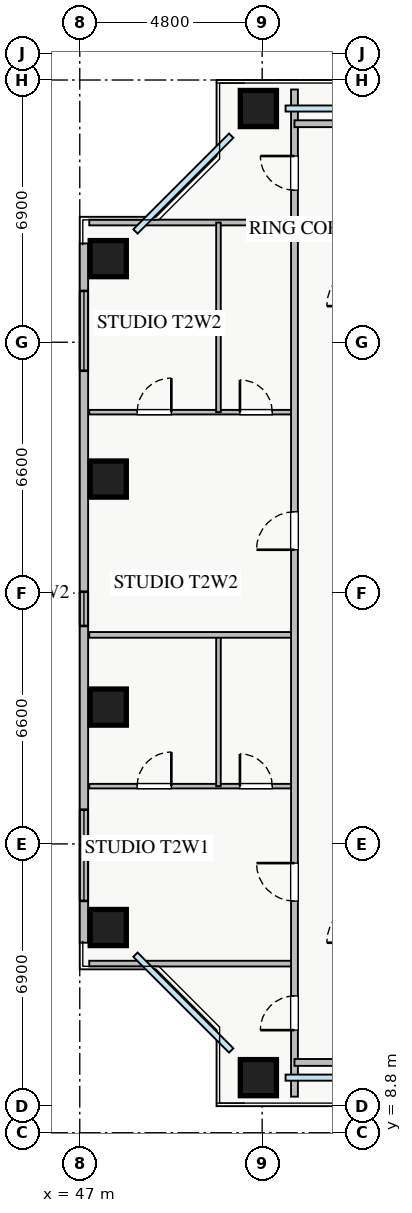
"""IFC4 building model, lengths in metres.
Left out: names, types, materials, properties, quantities, classifications, styles, units other than length and angle.
Written with IfcOpenShell. Run it as: python <this file> out.ifc"""

import sys

from ifc_helpers import new_model, si_unit, direction, frame, frame_2d, origin, origin_2d, place, context, subcontext, project, spatial, rectangle, extrude, source, transform, mapped, element, fill, save


model = new_model("IFC4")
c1 = context("Model", 3, precision=1e-05, world=origin(), true_north=direction((0.0, 1.0)))
c2 = subcontext(c1, "Body", "Model", "MODEL_VIEW")
j1 = project(units=[si_unit("LENGTHUNIT", "METRE"), si_unit("PLANEANGLEUNIT", "RADIAN")], contexts=[c1])
p1 = place(None, origin())
s1 = spatial("IfcSite", under=j1, at=p1, CompositionType="ELEMENT")
p2 = place(p1, origin())
s2 = spatial("IfcBuilding", under=s1, at=p2, CompositionType="ELEMENT")
p3 = place(p2, frame((0.0, 0.0, 29.5)))
s3 = spatial("IfcBuildingStorey", under=s2, at=p3, CompositionType="ELEMENT", Elevation=29.5)
m1 = source(origin(), c2, "Body", "SweptSolid", [
    extrude(rectangle(XDim=0.95, YDim=0.95, at=origin_2d()), origin(), (0.0, 0.0, 1.0), 3.25),
])
for number, where, z_axis, x_axis in (
    (1, (51.7, 10.25, 0.0), (0.0, 0.0, 1.0), (1.0, 0.0, 0.0)),
    (2, (51.7, 35.75, 0.0), (0.0, 0.0, 1.0), (1.0, 0.0, 0.0)),
    (3, (47.75, 14.2, 0.0), (0.0, 0.0, 1.0), (1.0, 0.0, 0.0)),
    (4, (47.75, 20.0, 0.0), (0.0, 0.0, 1.0), (1.0, 0.0, 0.0)),
    (5, (47.75, 26.0, 0.0), (0.0, 0.0, 1.0), (1.0, 0.0, 0.0)),
    (6, (47.75, 31.8, 0.0), (0.0, 0.0, 1.0), (1.0, 0.0, 0.0)),
):
    element("IfcColumn", number, at=place(p3, frame(where, z_axis=z_axis, x_axis=x_axis)), inside=s3, PredefinedType="COLUMN", context=c2, shape_type="MappedRepresentation", body=[
        mapped(m1, transform((0.0, 0.0, 0.0), x_axis=(1.0, 0.0, 0.0), y_axis=(0.0, 1.0, 0.0), z_axis=(0.0, 0.0, 1.0), scale=1.0)),
    ])
p4 = place(p3, frame((47.11, 13.8, 0.0), z_axis=(0.0, 0.0, 1.0), x_axis=(0.0, 1.0, 0.0)))
e7 = element("IfcWall", 7, at=p4, inside=s3, PredefinedType="STANDARD", context=c2, shape_type="SweptSolid", body=[
    extrude(rectangle(XDim=18.4, YDim=0.22, at=frame_2d((9.2, 0.0))), origin(), (0.0, 0.0, 1.0), 2.61),
])
p5 = place(p4, frame((1.1, 0.0, 0.9)))
e8 = element("IfcOpeningElement", 8, at=p5, cuts=e7, PredefinedType="OPENING", context=c2, shape_type="SweptSolid", body=[
    extrude(rectangle(XDim=2.4, YDim=1.48, at=frame_2d((1.2, 0.74))), frame((0.0, 0.12, 0.0), z_axis=(0.0, -1.0, 0.0), x_axis=(1.0, 0.0, 0.0)), (0.0, 0.0, 1.0), 0.24),
])
p6 = place(p4, frame((15.05, 0.0, 0.9)))
e9 = element("IfcOpeningElement", 9, at=p6, cuts=e7, PredefinedType="OPENING", context=c2, shape_type="SweptSolid", body=[
    extrude(rectangle(XDim=2.1, YDim=1.48, at=frame_2d((1.05, 0.74))), frame((0.0, 0.12, 0.0), z_axis=(0.0, -1.0, 0.0), x_axis=(1.0, 0.0, 0.0)), (0.0, 0.0, 1.0), 0.24),
])
p7 = place(p4, frame((8.335, 0.0, 0.9)))
e10 = element("IfcOpeningElement", 10, at=p7, cuts=e7, PredefinedType="OPENING", context=c2, shape_type="SweptSolid", body=[
    extrude(rectangle(XDim=0.9, YDim=1.2, at=frame_2d((0.45, 0.6))), frame((0.0, 0.12, 0.0), z_axis=(0.0, -1.0, 0.0), x_axis=(1.0, 0.0, 0.0)), (0.0, 0.0, 1.0), 0.24),
])
for number, where, z_axis, x_axis in (
    (11, (47.25, 32.75, 0.0), (0.0, 0.0, 1.0), (1.0, 0.0, 0.0)),
    (12, (47.25, 13.25, 0.0), (0.0, 0.0, 1.0), (1.0, 0.0, 0.0)),
):
    element("IfcWall", number, at=place(p3, frame(where, z_axis=z_axis, x_axis=x_axis)), inside=s3, PredefinedType="PARTITIONING", context=c2, shape_type="SweptSolid", body=[
        extrude(rectangle(XDim=5.4, YDim=0.15, at=frame_2d((2.7, 0.0))), origin(), (0.0, 0.0, 1.0), 3.07),
    ])
p8 = place(p3, frame((47.25, 17.92, 0.0), z_axis=(0.0, 0.0, 1.0), x_axis=(1.0, 0.0, 0.0)))
e13 = element("IfcWall", 13, at=p8, inside=s3, PredefinedType="PLUMBINGWALL", context=c2, shape_type="SweptSolid", body=[
    extrude(rectangle(XDim=5.4, YDim=0.12, at=frame_2d((2.7, 0.0))), origin(), (0.0, 0.0, 1.0), 3.07),
])
p9 = place(p8, frame((1.26, 0.0, 0.0)))
e14 = element("IfcOpeningElement", 14, at=p9, cuts=e13, PredefinedType="OPENING", context=c2, shape_type="SweptSolid", body=[
    extrude(rectangle(XDim=0.9, YDim=2.05, at=frame_2d((0.45, 1.025))), frame((0.0, 0.07, 0.0), z_axis=(0.0, -1.0, 0.0), x_axis=(1.0, 0.0, 0.0)), (0.0, 0.0, 1.0), 0.14),
])
p10 = place(p8, frame((3.965, 0.0, 0.0)))
e15 = element("IfcOpeningElement", 15, at=p10, cuts=e13, PredefinedType="OPENING", context=c2, shape_type="SweptSolid", body=[
    extrude(rectangle(XDim=0.85, YDim=2.05, at=frame_2d((0.425, 1.025))), frame((0.0, 0.07, 0.0), z_axis=(0.0, -1.0, 0.0), x_axis=(1.0, 0.0, 0.0)), (0.0, 0.0, 1.0), 0.14),
])
p11 = place(p3, frame((50.65, 17.92, 0.0), z_axis=(0.0, 0.0, 1.0), x_axis=(0.0, 1.0, 0.0)))
e16 = element("IfcWall", 16, at=p11, inside=s3, PredefinedType="PLUMBINGWALL", context=c2, shape_type="SweptSolid", body=[
    extrude(rectangle(XDim=3.98, YDim=0.12, at=frame_2d((1.99, 0.0))), origin(), (0.0, 0.0, 1.0), 3.07),
])
p12 = place(p3, frame((47.25, 27.76, 0.0), z_axis=(0.0, 0.0, 1.0), x_axis=(1.0, 0.0, 0.0)))
e17 = element("IfcWall", 17, at=p12, inside=s3, PredefinedType="PLUMBINGWALL", context=c2, shape_type="SweptSolid", body=[
    extrude(rectangle(XDim=5.4, YDim=0.12, at=frame_2d((2.7, 0.0))), origin(), (0.0, 0.0, 1.0), 3.07),
])
p13 = place(p12, frame((1.26, 0.0, 0.0)))
e18 = element("IfcOpeningElement", 18, at=p13, cuts=e17, PredefinedType="OPENING", context=c2, shape_type="SweptSolid", body=[
    extrude(rectangle(XDim=0.9, YDim=2.05, at=frame_2d((0.45, 1.025))), frame((0.0, 0.07, 0.0), z_axis=(0.0, -1.0, 0.0), x_axis=(1.0, 0.0, 0.0)), (0.0, 0.0, 1.0), 0.14),
])
p14 = place(p12, frame((3.965, 0.0, 0.0)))
e19 = element("IfcOpeningElement", 19, at=p14, cuts=e17, PredefinedType="OPENING", context=c2, shape_type="SweptSolid", body=[
    extrude(rectangle(XDim=0.85, YDim=2.05, at=frame_2d((0.425, 1.025))), frame((0.0, 0.07, 0.0), z_axis=(0.0, -1.0, 0.0), x_axis=(1.0, 0.0, 0.0)), (0.0, 0.0, 1.0), 0.14),
])
p15 = place(p3, frame((50.65, 27.76, 0.0), z_axis=(0.0, 0.0, 1.0), x_axis=(0.0, 1.0, 0.0)))
e20 = element("IfcWall", 20, at=p15, inside=s3, PredefinedType="PLUMBINGWALL", context=c2, shape_type="SweptSolid", body=[
    extrude(rectangle(XDim=4.99, YDim=0.12, at=frame_2d((2.495, 0.0))), origin(), (0.0, 0.0, 1.0), 3.07),
])
p16 = place(p3, frame((47.25, 21.9, 0.0), z_axis=(0.0, 0.0, 1.0), x_axis=(1.0, 0.0, 0.0)))
e21 = element("IfcWall", 21, at=p16, inside=s3, PredefinedType="PARTITIONING", context=c2, shape_type="SweptSolid", body=[
    extrude(rectangle(XDim=5.4, YDim=0.15, at=frame_2d((2.7, 0.0))), origin(), (0.0, 0.0, 1.0), 3.07),
])
p17 = place(p3, frame((52.65, 9.75, 0.0), z_axis=(0.0, 0.0, 1.0), x_axis=(0.0, 1.0, 0.0)))
e22 = element("IfcWall", 22, at=p17, inside=s3, PredefinedType="PARTITIONING", context=c2, shape_type="SweptSolid", body=[
    extrude(rectangle(XDim=26.5, YDim=0.18, at=frame_2d((13.25, 0.0))), origin(), (0.0, 0.0, 1.0), 3.07),
])
p18 = place(p17, frame((23.85, 0.0, 0.0)))
e23 = element("IfcOpeningElement", 23, at=p18, cuts=e22, PredefinedType="OPENING", context=c2, shape_type="SweptSolid", body=[
    extrude(rectangle(XDim=0.9, YDim=2.05, at=frame_2d((0.45, 1.025))), frame((0.0, 0.1, 0.0), z_axis=(0.0, -1.0, 0.0), x_axis=(1.0, 0.0, 0.0)), (0.0, 0.0, 1.0), 0.2),
])
p19 = place(p17, frame((1.75, 0.0, 0.0)))
e24 = element("IfcOpeningElement", 24, at=p19, cuts=e22, PredefinedType="OPENING", context=c2, shape_type="SweptSolid", body=[
    extrude(rectangle(XDim=0.9, YDim=2.05, at=frame_2d((0.45, 1.025))), frame((0.0, 0.1, 0.0), z_axis=(0.0, -1.0, 0.0), x_axis=(1.0, 0.0, 0.0)), (0.0, 0.0, 1.0), 0.2),
])
p20 = place(p17, frame((5.145, 0.0, 0.0)))
e25 = element("IfcOpeningElement", 25, at=p20, cuts=e22, PredefinedType="OPENING", context=c2, shape_type="SweptSolid", body=[
    extrude(rectangle(XDim=1.0, YDim=2.05, at=frame_2d((0.5, 1.025))), frame((0.0, 0.1, 0.0), z_axis=(0.0, -1.0, 0.0), x_axis=(1.0, 0.0, 0.0)), (0.0, 0.0, 1.0), 0.2),
])
p21 = place(p17, frame((14.39, 0.0, 0.0)))
e26 = element("IfcOpeningElement", 26, at=p21, cuts=e22, PredefinedType="OPENING", context=c2, shape_type="SweptSolid", body=[
    extrude(rectangle(XDim=1.0, YDim=2.05, at=frame_2d((0.5, 1.025))), frame((0.0, 0.1, 0.0), z_axis=(0.0, -1.0, 0.0), x_axis=(1.0, 0.0, 0.0)), (0.0, 0.0, 1.0), 0.2),
])
p22 = place(p3, frame((52.65, 35.35, 0.0), z_axis=(0.0, 0.0, 1.0), x_axis=(1.0, 0.0, 0.0)))
e27 = element("IfcWall", 27, at=p22, inside=s3, PredefinedType="PARTITIONING", context=c2, shape_type="SweptSolid", body=[
    extrude(rectangle(XDim=17.0, YDim=0.18, at=frame_2d((8.5, 0.0))), origin(), (0.0, 0.0, 1.0), 3.07),
])
p23 = place(p22, frame((3.825, 0.0, 0.0)))
e28 = element("IfcOpeningElement", 28, at=p23, cuts=e27, PredefinedType="OPENING", context=c2, shape_type="SweptSolid", body=[
    extrude(rectangle(XDim=0.9, YDim=2.05, at=frame_2d((0.45, 1.025))), frame((0.0, 0.1, 0.0), z_axis=(0.0, -1.0, 0.0), x_axis=(1.0, 0.0, 0.0)), (0.0, 0.0, 1.0), 0.2),
])
p24 = place(p22, frame((12.325, 0.0, 0.0)))
e29 = element("IfcOpeningElement", 29, at=p24, cuts=e27, PredefinedType="OPENING", context=c2, shape_type="SweptSolid", body=[
    extrude(rectangle(XDim=0.9, YDim=2.05, at=frame_2d((0.45, 1.025))), frame((0.0, 0.1, 0.0), z_axis=(0.0, -1.0, 0.0), x_axis=(1.0, 0.0, 0.0)), (0.0, 0.0, 1.0), 0.2),
])
p25 = place(p3, frame((52.65, 10.65, 0.0), z_axis=(0.0, 0.0, 1.0), x_axis=(1.0, 0.0, 0.0)))
e30 = element("IfcWall", 30, at=p25, inside=s3, PredefinedType="PARTITIONING", context=c2, shape_type="SweptSolid", body=[
    extrude(rectangle(XDim=17.0, YDim=0.18, at=frame_2d((8.5, 0.0))), origin(), (0.0, 0.0, 1.0), 3.07),
])
p26 = place(p25, frame((4.375, 0.0, 0.0)))
e31 = element("IfcOpeningElement", 31, at=p26, cuts=e30, PredefinedType="OPENING", context=c2, shape_type="SweptSolid", body=[
    extrude(rectangle(XDim=0.9, YDim=2.05, at=frame_2d((0.45, 1.025))), frame((0.0, 0.1, 0.0), z_axis=(0.0, -1.0, 0.0), x_axis=(1.0, 0.0, 0.0)), (0.0, 0.0, 1.0), 0.2),
])
p27 = place(p25, frame((12.875, 0.0, 0.0)))
e32 = element("IfcOpeningElement", 32, at=p27, cuts=e30, PredefinedType="OPENING", context=c2, shape_type="SweptSolid", body=[
    extrude(rectangle(XDim=0.9, YDim=2.05, at=frame_2d((0.45, 1.025))), frame((0.0, 0.1, 0.0), z_axis=(0.0, -1.0, 0.0), x_axis=(1.0, 0.0, 0.0)), (0.0, 0.0, 1.0), 0.2),
])
m2 = source(origin(), c2, "Body", "SweptSolid", [
    extrude(rectangle(XDim=2.4, YDim=1.48, at=frame_2d((1.2, 0.74))), frame((0.0, 0.03, 0.0), z_axis=(0.0, -1.0, 0.0), x_axis=(1.0, 0.0, 0.0)), (0.0, 0.0, 1.0), 0.06),
])
p28 = place(p5, origin())
e33 = element("IfcWindow", 33, at=p28, inside=s3, PartitioningType="TRIPLE_PANEL_VERTICAL", PredefinedType="WINDOW", context=c2, shape_type="MappedRepresentation", body=[
    mapped(m2, transform((0.0, 0.0, 0.0), x_axis=(1.0, 0.0, 0.0), y_axis=(0.0, 1.0, 0.0), z_axis=(0.0, 0.0, 1.0), scale=1.0)),
])
fill(e8, e33)
m3 = source(origin(), c2, "Body", "SweptSolid", [
    extrude(rectangle(XDim=2.1, YDim=1.48, at=frame_2d((1.05, 0.74))), frame((0.0, 0.03, 0.0), z_axis=(0.0, -1.0, 0.0), x_axis=(1.0, 0.0, 0.0)), (0.0, 0.0, 1.0), 0.06),
])
p29 = place(p6, origin())
e34 = element("IfcWindow", 34, at=p29, inside=s3, PartitioningType="TRIPLE_PANEL_VERTICAL", PredefinedType="WINDOW", context=c2, shape_type="MappedRepresentation", body=[
    mapped(m3, transform((0.0, 0.0, 0.0), x_axis=(1.0, 0.0, 0.0), y_axis=(0.0, 1.0, 0.0), z_axis=(0.0, 0.0, 1.0), scale=1.0)),
])
fill(e9, e34)
m4 = source(origin(), c2, "Body", "SweptSolid", [
    extrude(rectangle(XDim=0.9, YDim=2.05, at=frame_2d((0.45, 1.025))), frame((0.0, 0.025, 0.0), z_axis=(0.0, -1.0, 0.0), x_axis=(1.0, 0.0, 0.0)), (0.0, 0.0, 1.0), 0.05),
])
p30 = place(p9, origin())
e35 = element("IfcDoor", 35, at=p30, inside=s3, OperationType="SINGLE_SWING_RIGHT", PredefinedType="DOOR", context=c2, shape_type="MappedRepresentation", body=[
    mapped(m4, transform((0.0, 0.0, 0.0), x_axis=(1.0, 0.0, 0.0), y_axis=(0.0, 1.0, 0.0), z_axis=(0.0, 0.0, 1.0), scale=1.0)),
])
fill(e14, e35)
m5 = source(origin(), c2, "Body", "SweptSolid", [
    extrude(rectangle(XDim=0.85, YDim=2.05, at=frame_2d((0.425, 1.025))), frame((0.0, 0.025, 0.0), z_axis=(0.0, -1.0, 0.0), x_axis=(1.0, 0.0, 0.0)), (0.0, 0.0, 1.0), 0.05),
])
p31 = place(p10, origin())
e36 = element("IfcDoor", 36, at=p31, inside=s3, OperationType="SINGLE_SWING_LEFT", PredefinedType="DOOR", context=c2, shape_type="MappedRepresentation", body=[
    mapped(m5, transform((0.0, 0.0, 0.0), x_axis=(1.0, 0.0, 0.0), y_axis=(0.0, 1.0, 0.0), z_axis=(0.0, 0.0, 1.0), scale=1.0)),
])
fill(e15, e36)
p32 = place(p13, origin())
e37 = element("IfcDoor", 37, at=p32, inside=s3, OperationType="SINGLE_SWING_RIGHT", PredefinedType="DOOR", context=c2, shape_type="MappedRepresentation", body=[
    mapped(m4, transform((0.0, 0.0, 0.0), x_axis=(1.0, 0.0, 0.0), y_axis=(0.0, 1.0, 0.0), z_axis=(0.0, 0.0, 1.0), scale=1.0)),
])
fill(e18, e37)
p33 = place(p14, origin())
e38 = element("IfcDoor", 38, at=p33, inside=s3, OperationType="SINGLE_SWING_LEFT", PredefinedType="DOOR", context=c2, shape_type="MappedRepresentation", body=[
    mapped(m5, transform((0.0, 0.0, 0.0), x_axis=(1.0, 0.0, 0.0), y_axis=(0.0, 1.0, 0.0), z_axis=(0.0, 0.0, 1.0), scale=1.0)),
])
fill(e19, e38)
p34 = place(p18, origin())
e39 = element("IfcDoor", 39, at=p34, inside=s3, OperationType="SINGLE_SWING_RIGHT", PredefinedType="DOOR", context=c2, shape_type="MappedRepresentation", body=[
    mapped(m4, transform((0.0, 0.0, 0.0), x_axis=(1.0, 0.0, 0.0), y_axis=(0.0, 1.0, 0.0), z_axis=(0.0, 0.0, 1.0), scale=1.0)),
])
fill(e23, e39)
p35 = place(p19, origin())
e40 = element("IfcDoor", 40, at=p35, inside=s3, OperationType="SINGLE_SWING_LEFT", PredefinedType="DOOR", context=c2, shape_type="MappedRepresentation", body=[
    mapped(m4, transform((0.0, 0.0, 0.0), x_axis=(1.0, 0.0, 0.0), y_axis=(0.0, 1.0, 0.0), z_axis=(0.0, 0.0, 1.0), scale=1.0)),
])
fill(e24, e40)
m6 = source(origin(), c2, "Body", "SweptSolid", [
    extrude(rectangle(XDim=1.0, YDim=2.05, at=frame_2d((0.5, 1.025))), frame((0.0, 0.025, 0.0), z_axis=(0.0, -1.0, 0.0), x_axis=(1.0, 0.0, 0.0)), (0.0, 0.0, 1.0), 0.05),
])
p36 = place(p20, origin())
e41 = element("IfcDoor", 41, at=p36, inside=s3, OperationType="SINGLE_SWING_RIGHT", PredefinedType="DOOR", context=c2, shape_type="MappedRepresentation", body=[
    mapped(m6, transform((0.0, 0.0, 0.0), x_axis=(1.0, 0.0, 0.0), y_axis=(0.0, 1.0, 0.0), z_axis=(0.0, 0.0, 1.0), scale=1.0)),
])
fill(e25, e41)
p37 = place(p21, origin())
e42 = element("IfcDoor", 42, at=p37, inside=s3, OperationType="SINGLE_SWING_LEFT", PredefinedType="DOOR", context=c2, shape_type="MappedRepresentation", body=[
    mapped(m6, transform((0.0, 0.0, 0.0), x_axis=(1.0, 0.0, 0.0), y_axis=(0.0, 1.0, 0.0), z_axis=(0.0, 0.0, 1.0), scale=1.0)),
])
fill(e26, e42)
m7 = source(origin(), c2, "Body", "SweptSolid", [
    extrude(rectangle(XDim=0.9, YDim=1.2, at=frame_2d((0.45, 0.6))), frame((0.0, 0.03, 0.0), z_axis=(0.0, -1.0, 0.0), x_axis=(1.0, 0.0, 0.0)), (0.0, 0.0, 1.0), 0.06),
])
p38 = place(p7, origin())
e43 = element("IfcWindow", 43, at=p38, inside=s3, PartitioningType="SINGLE_PANEL", PredefinedType="WINDOW", context=c2, shape_type="MappedRepresentation", body=[
    mapped(m7, transform((0.0, 0.0, 0.0), x_axis=(1.0, 0.0, 0.0), y_axis=(0.0, 1.0, 0.0), z_axis=(0.0, 0.0, 1.0), scale=1.0)),
])
fill(e10, e43)
save(model, sys.argv[1])
